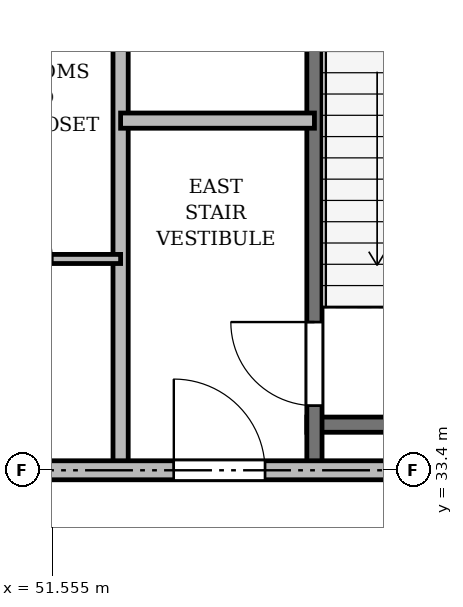
"""IFC4 building model, lengths in metres.
Left out: names, types, materials, properties, quantities, classifications, styles, units other than length and angle.
Written with IfcOpenShell. Run it as: python <this file> out.ifc"""

import sys

from ifc_helpers import new_model, si_unit, direction, frame, frame_2d, origin, place, context, subcontext, project, spatial, rectangle, extrude, source, transform, mapped, element, fill, save


model = new_model("IFC4")
c1 = context("Model", 3, precision=1e-05, world=origin(), true_north=direction((0.0, 1.0)))
c2 = subcontext(c1, "Body", "Model", "MODEL_VIEW")
j1 = project(units=[si_unit("LENGTHUNIT", "METRE"), si_unit("PLANEANGLEUNIT", "RADIAN")], contexts=[c1])
p1 = place(None, origin())
s1 = spatial("IfcSite", under=j1, at=p1, CompositionType="ELEMENT")
p2 = place(p1, origin())
s2 = spatial("IfcBuilding", under=s1, at=p2, CompositionType="ELEMENT")
p3 = place(p2, frame((0.0, 0.0, 18.7)))
s3 = spatial("IfcBuildingStorey", under=s2, at=p3, CompositionType="ELEMENT", Elevation=18.7)
p4 = place(p3, frame((54.9, 34.0, 0.0), z_axis=(0.0, 0.0, 1.0), x_axis=(1.0, 0.0, 0.0)))
e1 = element("IfcWall", 1, at=p4, inside=s3, PredefinedType="SHEAR", context=c2, shape_type="SweptSolid", body=[
    extrude(rectangle(XDim=3.4, YDim=0.2, at=frame_2d((1.7, 0.0))), origin(), (0.0, 0.0, 1.0), 4.42),
])
p5 = place(p3, frame((55.0, 33.4, 0.0), z_axis=(0.0, 0.0, 1.0), x_axis=(0.0, 1.0, 0.0)))
e2 = element("IfcWall", 2, at=p5, inside=s3, PredefinedType="SHEAR", context=c2, shape_type="SweptSolid", body=[
    extrude(rectangle(XDim=11.1, YDim=0.2, at=frame_2d((5.55, 0.0))), origin(), (0.0, 0.0, 1.0), 4.42),
])
p6 = place(p5, frame((0.85, 0.0, 0.0)))
e3 = element("IfcOpeningElement", 3, at=p6, cuts=e2, PredefinedType="OPENING", context=c2, shape_type="SweptSolid", body=[
    extrude(rectangle(XDim=1.1, YDim=2.15, at=frame_2d((0.55, 1.075))), frame((0.0, 0.11, 0.0), z_axis=(0.0, -1.0, 0.0), x_axis=(1.0, 0.0, 0.0)), (0.0, 0.0, 1.0), 0.22),
])
p7 = place(p3, frame((52.45, 33.4, 0.0), z_axis=(0.0, 0.0, 1.0), x_axis=(0.0, 1.0, 0.0)))
e4 = element("IfcWall", 4, at=p7, inside=s3, PredefinedType="PARTITIONING", context=c2, shape_type="SweptSolid", body=[
    extrude(rectangle(XDim=8.65, YDim=0.2, at=frame_2d((4.325, 0.0))), origin(), (0.0, 0.0, 1.0), 2.62),
])
p8 = place(p7, frame((6.2, 0.0, 0.0)))
e5 = element("IfcOpeningElement", 5, at=p8, cuts=e4, PredefinedType="OPENING", context=c2, shape_type="SweptSolid", body=[
    extrude(rectangle(XDim=0.95, YDim=2.15, at=frame_2d((0.475, 1.075))), frame((0.0, 0.11, 0.0), z_axis=(0.0, -1.0, 0.0), x_axis=(1.0, 0.0, 0.0)), (0.0, 0.0, 1.0), 0.22),
])
p9 = place(p3, frame((52.45, 38.0, 0.0), z_axis=(0.0, 0.0, 1.0), x_axis=(1.0, 0.0, 0.0)))
e6 = element("IfcWall", 6, at=p9, inside=s3, PredefinedType="PARTITIONING", context=c2, shape_type="SweptSolid", body=[
    extrude(rectangle(XDim=2.55, YDim=0.2, at=frame_2d((1.275, 0.0))), origin(), (0.0, 0.0, 1.0), 4.42),
])
p10 = place(p3, frame((47.15, 36.18, 0.0), z_axis=(0.0, 0.0, 1.0), x_axis=(1.0, 0.0, 0.0)))
e7 = element("IfcWall", 7, at=p10, inside=s3, PredefinedType="PARTITIONING", context=c2, shape_type="SweptSolid", body=[
    extrude(rectangle(XDim=5.3, YDim=0.12, at=frame_2d((2.65, 0.0))), origin(), (0.0, 0.0, 1.0), 4.42),
])
p11 = place(p10, frame((0.75, 0.0, 0.0)))
e8 = element("IfcOpeningElement", 8, at=p11, cuts=e7, PredefinedType="OPENING", context=c2, shape_type="SweptSolid", body=[
    extrude(rectangle(XDim=0.95, YDim=2.15, at=frame_2d((0.475, 1.075))), frame((0.0, 0.07, 0.0), z_axis=(0.0, -1.0, 0.0), x_axis=(1.0, 0.0, 0.0)), (0.0, 0.0, 1.0), 0.14),
])
p12 = place(p10, frame((3.45, 0.0, 0.0)))
e9 = element("IfcOpeningElement", 9, at=p12, cuts=e7, PredefinedType="OPENING", context=c2, shape_type="SweptSolid", body=[
    extrude(rectangle(XDim=0.95, YDim=2.15, at=frame_2d((0.475, 1.075))), frame((0.0, 0.07, 0.0), z_axis=(0.0, -1.0, 0.0), x_axis=(1.0, 0.0, 0.0)), (0.0, 0.0, 1.0), 0.14),
])
p13 = place(p3, frame((47.15, 33.4, 0.0), z_axis=(0.0, 0.0, 1.0), x_axis=(1.0, 0.0, 0.0)))
e10 = element("IfcWall", 10, at=p13, inside=s3, PredefinedType="PARTITIONING", context=c2, shape_type="SweptSolid", body=[
    extrude(rectangle(XDim=11.15, YDim=0.25, at=frame_2d((5.575, 0.0))), origin(), (0.0, 0.0, 1.0), 2.62),
])
p14 = place(p13, frame((0.7, 0.0, 0.0)))
e11 = element("IfcOpeningElement", 11, at=p14, cuts=e10, PredefinedType="OPENING", context=c2, shape_type="SweptSolid", body=[
    extrude(rectangle(XDim=0.95, YDim=2.15, at=frame_2d((0.475, 1.075))), frame((0.0, 0.135, 0.0), z_axis=(0.0, -1.0, 0.0), x_axis=(1.0, 0.0, 0.0)), (0.0, 0.0, 1.0), 0.27),
])
p15 = place(p13, frame((6.0, 0.0, 0.0)))
e12 = element("IfcOpeningElement", 12, at=p15, cuts=e10, PredefinedType="OPENING", context=c2, shape_type="SweptSolid", body=[
    extrude(rectangle(XDim=1.2, YDim=2.15, at=frame_2d((0.6, 1.075))), frame((0.0, 0.135, 0.0), z_axis=(0.0, -1.0, 0.0), x_axis=(1.0, 0.0, 0.0)), (0.0, 0.0, 1.0), 0.27),
])
m1 = source(origin(), c2, "Body", "SweptSolid", [
    extrude(rectangle(XDim=1.1, YDim=2.15, at=frame_2d((0.55, 1.075))), frame((0.0, 0.025, 0.0), z_axis=(0.0, -1.0, 0.0), x_axis=(1.0, 0.0, 0.0)), (0.0, 0.0, 1.0), 0.05),
])
p16 = place(p6, origin())
e13 = element("IfcDoor", 13, at=p16, inside=s3, OperationType="SINGLE_SWING_RIGHT", PredefinedType="DOOR", context=c2, shape_type="MappedRepresentation", body=[
    mapped(m1, transform((0.0, 0.0, 0.0), x_axis=(1.0, 0.0, 0.0), y_axis=(0.0, 1.0, 0.0), z_axis=(0.0, 0.0, 1.0), scale=1.0)),
])
fill(e3, e13)
m2 = source(origin(), c2, "Body", "SweptSolid", [
    extrude(rectangle(XDim=1.2, YDim=2.15, at=frame_2d((0.6, 1.075))), frame((0.0, 0.025, 0.0), z_axis=(0.0, -1.0, 0.0), x_axis=(1.0, 0.0, 0.0)), (0.0, 0.0, 1.0), 0.05),
])
p17 = place(p15, origin())
e14 = element("IfcDoor", 14, at=p17, inside=s3, OperationType="SINGLE_SWING_LEFT", PredefinedType="DOOR", context=c2, shape_type="MappedRepresentation", body=[
    mapped(m2, transform((0.0, 0.0, 0.0), x_axis=(1.0, 0.0, 0.0), y_axis=(0.0, 1.0, 0.0), z_axis=(0.0, 0.0, 1.0), scale=1.0)),
])
fill(e12, e14)
save(model, sys.argv[1])
